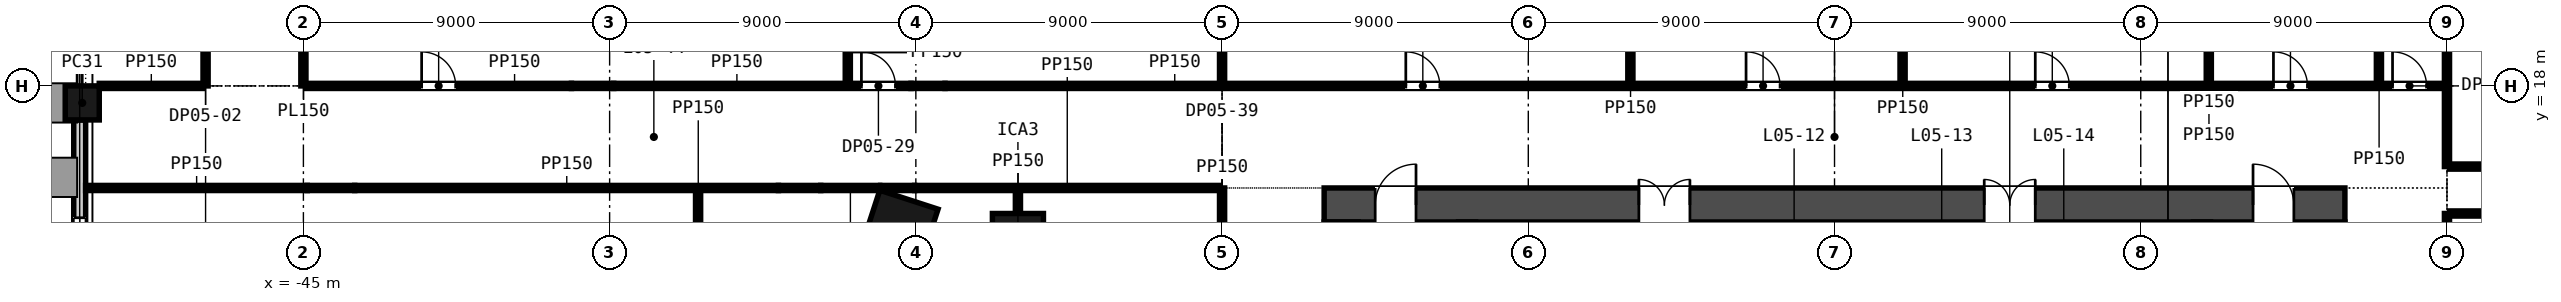
"""IFC4 building model, lengths in metres.
Left out: names, types, materials, properties, quantities, classifications, styles, units other than length and angle.
Written with IfcOpenShell. Run it as: python <this file> out.ifc"""

import sys

from ifc_helpers import new_model, si_unit, direction, frame, frame_2d, origin, origin_2d, place, context, subcontext, project, spatial, rectangle, extrude, element, fill, save


model = new_model("IFC4")
c1 = context("Model", 3, precision=1e-05, world=origin(), true_north=direction((0.0, 1.0)))
c2 = subcontext(c1, "Body", "Model", "MODEL_VIEW")
j1 = project(units=[si_unit("LENGTHUNIT", "METRE"), si_unit("PLANEANGLEUNIT", "RADIAN")], contexts=[c1])
p1 = place(None, origin())
s1 = spatial("IfcSite", under=j1, at=p1, CompositionType="ELEMENT")
p2 = place(p1, origin())
s2 = spatial("IfcBuilding", under=s1, at=p2, CompositionType="ELEMENT")
p3 = place(p2, frame((0.0, 0.0, 31.5)))
s3 = spatial("IfcBuildingStorey", under=s2, at=p3, CompositionType="ELEMENT", Elevation=31.5)
p4 = place(p3, frame((-15.0, 14.5, -0.3), z_axis=(0.0, 0.0, 1.0), x_axis=(1.0, 0.0, 0.0)))
e1 = element("IfcWall", 1, at=p4, inside=s3, PredefinedType="SOLIDWALL", context=c2, shape_type="SweptSolid", body=[
    extrude(rectangle(XDim=30.0, YDim=1.0, at=frame_2d((15.0, 0.0))), origin(), (0.0, 0.0, 1.0), 4.65),
])
p5 = place(p4, frame((9.25, 0.0, 0.3)))
e2 = element("IfcOpeningElement", 2, at=p5, cuts=e1, PredefinedType="OPENING", context=c2, shape_type="SweptSolid", body=[
    extrude(rectangle(XDim=1.5, YDim=2.1, at=frame_2d((0.75, 1.05))), frame((0.0, 0.51, 0.0), z_axis=(0.0, -1.0, 0.0), x_axis=(1.0, 0.0, 0.0)), (0.0, 0.0, 1.0), 1.02),
])
p6 = place(p4, frame((19.4, 0.0, 0.3)))
e3 = element("IfcOpeningElement", 3, at=p6, cuts=e1, PredefinedType="OPENING", context=c2, shape_type="SweptSolid", body=[
    extrude(rectangle(XDim=1.5, YDim=2.1, at=frame_2d((0.75, 1.05))), frame((0.0, 0.51, 0.0), z_axis=(0.0, -1.0, 0.0), x_axis=(1.0, 0.0, 0.0)), (0.0, 0.0, 1.0), 1.02),
])
p7 = place(p4, frame((1.5, 0.0, 0.3)))
e4 = element("IfcOpeningElement", 4, at=p7, cuts=e1, PredefinedType="OPENING", context=c2, shape_type="SweptSolid", body=[
    extrude(rectangle(XDim=1.2, YDim=2.1, at=frame_2d((0.6, 1.05))), frame((0.0, 0.51, 0.0), z_axis=(0.0, -1.0, 0.0), x_axis=(1.0, 0.0, 0.0)), (0.0, 0.0, 1.0), 1.02),
])
p8 = place(p4, frame((27.3, 0.0, 0.3)))
e5 = element("IfcOpeningElement", 5, at=p8, cuts=e1, PredefinedType="OPENING", context=c2, shape_type="SweptSolid", body=[
    extrude(rectangle(XDim=1.2, YDim=2.1, at=frame_2d((0.6, 1.05))), frame((0.0, 0.51, 0.0), z_axis=(0.0, -1.0, 0.0), x_axis=(1.0, 0.0, 0.0)), (0.0, 0.0, 1.0), 1.02),
])
p9 = place(p3, frame((-27.482, 13.799, -0.3), z_axis=(0.0, 0.0, 1.0), x_axis=(-0.309016994375, -0.951056516295, 0.0)))
e6 = element("IfcColumn", 6, at=p9, inside=s3, PredefinedType="COLUMN", context=c2, shape_type="SweptSolid", body=[
    extrude(rectangle(XDim=1.8, YDim=1.8, at=origin_2d()), origin(), (0.0, 0.0, 1.0), 4.65),
])
p10 = place(p3, frame((-24.0, 13.5, -0.3), z_axis=(0.0, 0.0, 1.0), x_axis=(1.0, 0.0, 0.0)))
e7 = element("IfcColumn", 7, at=p10, inside=s3, PredefinedType="COLUMN", context=c2, shape_type="SweptSolid", body=[
    extrude(rectangle(XDim=1.5, YDim=1.5, at=origin_2d()), origin(), (0.0, 0.0, 1.0), 4.65),
])
p11 = place(p3, frame((-51.5, 17.5, -0.3), z_axis=(0.0, 0.0, 1.0), x_axis=(0.0, -1.0, 0.0)))
e8 = element("IfcColumn", 8, at=p11, inside=s3, PredefinedType="COLUMN", context=c2, shape_type="SweptSolid", body=[
    extrude(rectangle(XDim=1.0, YDim=1.0, at=origin_2d()), origin(), (0.0, 0.0, 1.0), 4.65),
])
p12 = place(p3, frame((-51.575, 17.0, -0.3), z_axis=(0.0, 0.0, 1.0), x_axis=(0.0, -1.0, 0.0)))
e9 = element("IfcWall", 9, at=p12, inside=s3, PredefinedType="SOLIDWALL", context=c2, shape_type="SweptSolid", body=[
    extrude(rectangle(XDim=7.75, YDim=0.35, at=frame_2d((3.875, 0.0))), origin(), (0.0, 0.0, 1.0), 3.75),
])
p13 = place(p12, frame((2.875, 0.0, 1.2)))
e10 = element("IfcOpeningElement", 10, at=p13, cuts=e9, PredefinedType="OPENING", context=c2, shape_type="SweptSolid", body=[
    extrude(rectangle(XDim=2.0, YDim=2.5, at=frame_2d((1.0, 1.25))), frame((0.0, 0.185, 0.0), z_axis=(0.0, -1.0, 0.0), x_axis=(1.0, 0.0, 0.0)), (0.0, 0.0, 1.0), 0.37),
])
for number, where, z_axis, x_axis in (
    (11, (-8.275, 11.3, 0.0), (0.0, 0.0, 1.0), (0.0, 1.0, 0.0)),
    (12, (-5.875, 11.3, 0.0), (0.0, 0.0, 1.0), (0.0, 1.0, 0.0)),
    (13, (-4.125, 11.3, 0.0), (0.0, 0.0, 1.0), (0.0, 1.0, 0.0)),
    (14, (-1.325, 11.3, 0.0), (0.0, 0.0, 1.0), (0.0, 1.0, 0.0)),
    (15, (1.475, 11.3, 0.0), (0.0, 0.0, 1.0), (0.0, 1.0, 0.0)),
    (16, (4.275, 11.3, 0.0), (0.0, 0.0, 1.0), (0.0, 1.0, 0.0)),
    (17, (6.025, 11.3, 0.0), (0.0, 0.0, 1.0), (0.0, 1.0, 0.0)),
    (18, (8.825, 11.3, 0.0), (0.0, 0.0, 1.0), (0.0, 1.0, 0.0)),
):
    element("IfcWall", number, at=place(p3, frame(where, z_axis=z_axis, x_axis=x_axis)), inside=s3, PredefinedType="PARTITIONING", context=c2, shape_type="SweptSolid", body=[
        extrude(rectangle(XDim=2.7, YDim=0.25, at=frame_2d((1.35, 0.0))), origin(), (0.0, 0.0, 1.0), 4.35),
    ])
p14 = place(p3, frame((18.075, 14.25, 0.0), z_axis=(0.0, 0.0, 1.0), x_axis=(1.0, 0.0, 0.0)))
e19 = element("IfcWall", 19, at=p14, inside=s3, PredefinedType="PARTITIONING", context=c2, shape_type="SweptSolid", body=[
    extrude(rectangle(XDim=5.175, YDim=0.15, at=frame_2d((2.587, 0.0))), origin(), (0.0, 0.0, 1.0), 4.35),
])
p15 = place(p3, frame((-51.4, 15.0, 0.0), z_axis=(0.0, 0.0, 1.0), x_axis=(1.0, 0.0, 0.0)))
e20 = element("IfcWall", 20, at=p15, inside=s3, PredefinedType="PARTITIONING", context=c2, shape_type="SweptSolid", body=[
    extrude(rectangle(XDim=6.514, YDim=0.15, at=frame_2d((3.257, 0.0))), origin(), (0.0, 0.0, 1.0), 4.35),
])
p16 = place(p3, frame((-44.886, 15.0, 0.0), z_axis=(0.0, 0.0, 1.0), x_axis=(1.0, 0.0, 0.0)))
e21 = element("IfcWall", 21, at=p16, inside=s3, PredefinedType="PARTITIONING", context=c2, shape_type="SweptSolid", body=[
    extrude(rectangle(XDim=1.395, YDim=0.15, at=frame_2d((0.697, 0.0))), origin(), (0.0, 0.0, 1.0), 3.369),
])
p17 = place(p3, frame((-43.491, 15.0, 0.0), z_axis=(0.0, 0.0, 1.0), x_axis=(1.0, 0.0, 0.0)))
e22 = element("IfcWall", 22, at=p17, inside=s3, PredefinedType="PARTITIONING", context=c2, shape_type="SweptSolid", body=[
    extrude(rectangle(XDim=12.452, YDim=0.15, at=frame_2d((6.226, 0.0))), origin(), (0.0, 0.0, 1.0), 4.35),
])
p18 = place(p3, frame((-31.039, 15.0, 0.0), z_axis=(0.0, 0.0, 1.0), x_axis=(1.0, 0.0, 0.0)))
e23 = element("IfcWall", 23, at=p18, inside=s3, PredefinedType="PARTITIONING", context=c2, shape_type="SweptSolid", body=[
    extrude(rectangle(XDim=1.244, YDim=0.15, at=frame_2d((0.622, 0.0))), origin(), (0.0, 0.0, 1.0), 3.261),
])
p19 = place(p3, frame((-29.795, 15.0, 0.0), z_axis=(0.0, 0.0, 1.0), x_axis=(1.0, 0.0, 0.0)))
e24 = element("IfcWall", 24, at=p19, inside=s3, PredefinedType="PARTITIONING", context=c2, shape_type="SweptSolid", body=[
    extrude(rectangle(XDim=1.733, YDim=0.15, at=frame_2d((0.867, 0.0))), origin(), (0.0, 0.0, 1.0), 4.35),
])
p20 = place(p3, frame((-28.035, 15.0, 0.0), z_axis=(0.0, 0.0, 1.0), x_axis=(1.0, 0.0, 0.0)))
e25 = element("IfcWall", 25, at=p20, inside=s3, PredefinedType="PARTITIONING", context=c2, shape_type="SweptSolid", body=[
    extrude(rectangle(XDim=1.0, YDim=0.15, at=frame_2d((0.5, 0.0))), origin(), (0.0, 0.0, 1.0), 3.5),
])
p21 = place(p3, frame((-27.035, 15.0, 0.0), z_axis=(0.0, 0.0, 1.0), x_axis=(1.0, 0.0, 0.0)))
e26 = element("IfcWall", 26, at=p21, inside=s3, PredefinedType="PARTITIONING", context=c2, shape_type="SweptSolid", body=[
    extrude(rectangle(XDim=8.96, YDim=0.15, at=frame_2d((4.48, 0.0))), origin(), (0.0, 0.0, 1.0), 4.35),
])
p22 = place(p3, frame((18.075, 15.629, 0.0), z_axis=(0.0, 0.0, 1.0), x_axis=(1.0, 0.0, 0.0)))
e27 = element("IfcWall", 27, at=p22, inside=s3, PredefinedType="PARTITIONING", context=c2, shape_type="SweptSolid", body=[
    extrude(rectangle(XDim=7.482, YDim=0.15, at=frame_2d((3.741, 0.0))), origin(), (0.0, 0.0, 1.0), 4.35),
])
p23 = place(p3, frame((-51.0, 18.0, 0.0), z_axis=(0.0, 0.0, 1.0), x_axis=(1.0, 0.0, 0.0)))
e28 = element("IfcWall", 28, at=p23, inside=s3, PredefinedType="PARTITIONING", context=c2, shape_type="SweptSolid", body=[
    extrude(rectangle(XDim=3.05, YDim=0.15, at=frame_2d((1.525, 0.0))), origin(), (0.0, 0.0, 1.0), 4.35),
])
p24 = place(p3, frame((-44.925, 18.0, 0.0), z_axis=(0.0, 0.0, 1.0), x_axis=(1.0, 0.0, 0.0)))
e29 = element("IfcWall", 29, at=p24, inside=s3, PredefinedType="PARTITIONING", context=c2, shape_type="SweptSolid", body=[
    extrude(rectangle(XDim=7.803, YDim=0.15, at=frame_2d((3.901, 0.0))), origin(), (0.0, 0.0, 1.0), 4.35),
])
p25 = place(p24, frame((3.4, 0.0, 0.0)))
e30 = element("IfcOpeningElement", 30, at=p25, cuts=e29, PredefinedType="OPENING", context=c2, shape_type="SweptSolid", body=[
    extrude(rectangle(XDim=1.0, YDim=2.1, at=frame_2d((0.5, 1.05))), frame((0.0, 0.085, 0.0), z_axis=(0.0, -1.0, 0.0), x_axis=(1.0, 0.0, 0.0)), (0.0, 0.0, 1.0), 0.17),
])
p26 = place(p3, frame((-37.122, 18.0, 0.0), z_axis=(0.0, 0.0, 1.0), x_axis=(1.0, 0.0, 0.0)))
e31 = element("IfcWall", 31, at=p26, inside=s3, PredefinedType="PARTITIONING", context=c2, shape_type="SweptSolid", body=[
    extrude(rectangle(XDim=1.244, YDim=0.15, at=frame_2d((0.622, 0.0))), origin(), (0.0, 0.0, 1.0), 3.261),
])
p27 = place(p3, frame((-35.879, 18.0, 0.0), z_axis=(0.0, 0.0, 1.0), x_axis=(1.0, 0.0, 0.0)))
e32 = element("IfcWall", 32, at=p27, inside=s3, PredefinedType="PARTITIONING", context=c2, shape_type="SweptSolid", body=[
    extrude(rectangle(XDim=8.736, YDim=0.15, at=frame_2d((4.368, 0.0))), origin(), (0.0, 0.0, 1.0), 4.35),
])
p28 = place(p27, frame((7.279, 0.0, 0.0)))
e33 = element("IfcOpeningElement", 33, at=p28, cuts=e32, PredefinedType="OPENING", context=c2, shape_type="SweptSolid", body=[
    extrude(rectangle(XDim=1.0, YDim=2.1, at=frame_2d((0.5, 1.05))), frame((0.0, 0.085, 0.0), z_axis=(0.0, -1.0, 0.0), x_axis=(1.0, 0.0, 0.0)), (0.0, 0.0, 1.0), 0.17),
])
p29 = place(p3, frame((-27.142, 18.0, 0.0), z_axis=(0.0, 0.0, 1.0), x_axis=(1.0, 0.0, 0.0)))
e34 = element("IfcWall", 34, at=p29, inside=s3, PredefinedType="PARTITIONING", context=c2, shape_type="SweptSolid", body=[
    extrude(rectangle(XDim=1.0, YDim=0.15, at=frame_2d((0.5, 0.0))), origin(), (0.0, 0.0, 1.0), 3.5),
])
p30 = place(p3, frame((-26.142, 18.0, 0.0), z_axis=(0.0, 0.0, 1.0), x_axis=(1.0, 0.0, 0.0)))
e35 = element("IfcWall", 35, at=p30, inside=s3, PredefinedType="PARTITIONING", context=c2, shape_type="SweptSolid", body=[
    extrude(rectangle(XDim=44.067, YDim=0.15, at=frame_2d((22.034, 0.0))), origin(), (0.0, 0.0, 1.0), 4.35),
])
p31 = place(p30, frame((13.542, 0.0, 0.0)))
e36 = element("IfcOpeningElement", 36, at=p31, cuts=e35, PredefinedType="OPENING", context=c2, shape_type="SweptSolid", body=[
    extrude(rectangle(XDim=1.0, YDim=2.1, at=frame_2d((0.5, 1.05))), frame((0.0, 0.085, 0.0), z_axis=(0.0, -1.0, 0.0), x_axis=(1.0, 0.0, 0.0)), (0.0, 0.0, 1.0), 0.17),
])
p32 = place(p30, frame((23.542, 0.0, 0.0)))
e37 = element("IfcOpeningElement", 37, at=p32, cuts=e35, PredefinedType="OPENING", context=c2, shape_type="SweptSolid", body=[
    extrude(rectangle(XDim=1.0, YDim=2.1, at=frame_2d((0.5, 1.05))), frame((0.0, 0.085, 0.0), z_axis=(0.0, -1.0, 0.0), x_axis=(1.0, 0.0, 0.0)), (0.0, 0.0, 1.0), 0.17),
])
p33 = place(p30, frame((32.042, 0.0, 0.0)))
e38 = element("IfcOpeningElement", 38, at=p33, cuts=e35, PredefinedType="OPENING", context=c2, shape_type="SweptSolid", body=[
    extrude(rectangle(XDim=1.0, YDim=2.1, at=frame_2d((0.5, 1.05))), frame((0.0, 0.085, 0.0), z_axis=(0.0, -1.0, 0.0), x_axis=(1.0, 0.0, 0.0)), (0.0, 0.0, 1.0), 0.17),
])
p34 = place(p30, frame((39.042, 0.0, 0.0)))
e39 = element("IfcOpeningElement", 39, at=p34, cuts=e35, PredefinedType="OPENING", context=c2, shape_type="SweptSolid", body=[
    extrude(rectangle(XDim=1.0, YDim=2.1, at=frame_2d((0.5, 1.05))), frame((0.0, 0.085, 0.0), z_axis=(0.0, -1.0, 0.0), x_axis=(1.0, 0.0, 0.0)), (0.0, 0.0, 1.0), 0.17),
])
p35 = place(p30, frame((42.542, 0.0, 0.0)))
e40 = element("IfcOpeningElement", 40, at=p35, cuts=e35, PredefinedType="OPENING", context=c2, shape_type="SweptSolid", body=[
    extrude(rectangle(XDim=1.0, YDim=2.1, at=frame_2d((0.5, 1.05))), frame((0.0, 0.085, 0.0), z_axis=(0.0, -1.0, 0.0), x_axis=(1.0, 0.0, 0.0)), (0.0, 0.0, 1.0), 0.17),
])
p36 = place(p3, frame((-47.875, 18.0, 0.0), z_axis=(0.0, 0.0, 1.0), x_axis=(0.0, 1.0, 0.0)))
e41 = element("IfcWall", 41, at=p36, inside=s3, PredefinedType="PARTITIONING", context=c2, shape_type="SweptSolid", body=[
    extrude(rectangle(XDim=5.109, YDim=0.15, at=frame_2d((2.555, 0.0))), origin(), (0.0, 0.0, 1.0), 4.35),
])
p37 = place(p36, frame((3.65, 0.0, 0.0)))
e42 = element("IfcOpeningElement", 42, at=p37, cuts=e41, PredefinedType="OPENING", context=c2, shape_type="SweptSolid", body=[
    extrude(rectangle(XDim=0.9, YDim=2.1, at=frame_2d((0.45, 1.05))), frame((0.0, 0.085, 0.0), z_axis=(0.0, -1.0, 0.0), x_axis=(1.0, 0.0, 0.0)), (0.0, 0.0, 1.0), 0.17),
])
p38 = place(p3, frame((-45.0, 18.0, 0.0), z_axis=(0.0, 0.0, 1.0), x_axis=(0.0, 1.0, 0.0)))
e43 = element("IfcWall", 43, at=p38, inside=s3, PredefinedType="PARTITIONING", context=c2, shape_type="SweptSolid", body=[
    extrude(rectangle(XDim=3.691, YDim=0.15, at=frame_2d((1.846, 0.0))), origin(), (0.0, 0.0, 1.0), 4.35),
])
p39 = place(p3, frame((-33.4, 1.326, 0.0), z_axis=(0.0, 0.0, 1.0), x_axis=(0.0, 1.0, 0.0)))
e44 = element("IfcWall", 44, at=p39, inside=s3, PredefinedType="PARTITIONING", context=c2, shape_type="SweptSolid", body=[
    extrude(rectangle(XDim=13.599, YDim=0.15, at=frame_2d((6.8, 0.0))), origin(), (0.0, 0.0, 1.0), 4.35),
])
p40 = place(p3, frame((-29.0, 18.075, 0.0), z_axis=(0.0, 0.0, 1.0), x_axis=(0.0, 1.0, 0.0)))
e45 = element("IfcWall", 45, at=p40, inside=s3, PredefinedType="PARTITIONING", context=c2, shape_type="SweptSolid", body=[
    extrude(rectangle(XDim=1.802, YDim=0.15, at=frame_2d((0.901, 0.0))), origin(), (0.0, 0.0, 1.0), 3.261),
])
p41 = place(p3, frame((-24.0, 14.25, 0.0), z_axis=(0.0, 0.0, 1.0), x_axis=(0.0, 1.0, 0.0)))
e46 = element("IfcWall", 46, at=p41, inside=s3, PredefinedType="PARTITIONING", context=c2, shape_type="SweptSolid", body=[
    extrude(rectangle(XDim=0.675, YDim=0.15, at=frame_2d((0.337, 0.0))), origin(), (0.0, 0.0, 1.0), 3.747),
])
p42 = place(p3, frame((-18.0, 1.251, 0.0), z_axis=(0.0, 0.0, 1.0), x_axis=(0.0, 1.0, 0.0)))
e47 = element("IfcWall", 47, at=p42, inside=s3, PredefinedType="PARTITIONING", context=c2, shape_type="SweptSolid", body=[
    extrude(rectangle(XDim=13.749, YDim=0.15, at=frame_2d((6.875, 0.0))), origin(), (0.0, 0.0, 1.0), 4.35),
])
p43 = place(p42, frame((5.9, 0.0, 0.0)))
e48 = element("IfcOpeningElement", 48, at=p43, cuts=e47, PredefinedType="OPENING", context=c2, shape_type="SweptSolid", body=[
    extrude(rectangle(XDim=1.8, YDim=2.4, at=frame_2d((0.9, 1.2))), frame((0.0, 0.085, 0.0), z_axis=(0.0, -1.0, 0.0), x_axis=(1.0, 0.0, 0.0)), (0.0, 0.0, 1.0), 0.17),
])
p44 = place(p3, frame((-18.0, 18.075, 0.0), z_axis=(0.0, 0.0, 1.0), x_axis=(0.0, 1.0, 0.0)))
e49 = element("IfcWall", 49, at=p44, inside=s3, PredefinedType="PARTITIONING", context=c2, shape_type="SweptSolid", body=[
    extrude(rectangle(XDim=13.025, YDim=0.15, at=frame_2d((6.513, 0.0))), origin(), (0.0, 0.0, 1.0), 4.35),
])
for number, where, z_axis, x_axis in (
    (50, (-6.0, 18.075, 0.0), (0.0, 0.0, 1.0), (0.0, 1.0, 0.0)),
    (51, (2.0, 18.075, 0.0), (0.0, 0.0, 1.0), (0.0, 1.0, 0.0)),
):
    element("IfcWall", number, at=place(p3, frame(where, z_axis=z_axis, x_axis=x_axis)), inside=s3, PredefinedType="PARTITIONING", context=c2, shape_type="SweptSolid", body=[
        extrude(rectangle(XDim=12.125, YDim=0.15, at=frame_2d((6.062, 0.0))), origin(), (0.0, 0.0, 1.0), 4.35),
    ])
p45 = place(p3, frame((11.0, 18.075, 0.0), z_axis=(0.0, 0.0, 1.0), x_axis=(0.0, 1.0, 0.0)))
e52 = element("IfcWall", 52, at=p45, inside=s3, PredefinedType="PARTITIONING", context=c2, shape_type="SweptSolid", body=[
    extrude(rectangle(XDim=8.868, YDim=0.15, at=frame_2d((4.434, 0.0))), origin(), (0.0, 0.0, 1.0), 3.671),
])
p46 = place(p3, frame((16.0, 18.075, 0.0), z_axis=(0.0, 0.0, 1.0), x_axis=(0.0, 1.0, 0.0)))
e53 = element("IfcWall", 53, at=p46, inside=s3, PredefinedType="PARTITIONING", context=c2, shape_type="SweptSolid", body=[
    extrude(rectangle(XDim=9.626, YDim=0.15, at=frame_2d((4.813, 0.0))), origin(), (0.0, 0.0, 1.0), 4.35),
])
p47 = place(p3, frame((18.0, 0.0, 0.0), z_axis=(0.0, 0.0, 1.0), x_axis=(0.0, 1.0, 0.0)))
e54 = element("IfcWall", 54, at=p47, inside=s3, PredefinedType="PARTITIONING", context=c2, shape_type="SweptSolid", body=[
    extrude(rectangle(XDim=14.25, YDim=0.15, at=frame_2d((7.125, 0.0))), origin(), (0.0, 0.0, 1.0), 4.35),
])
p48 = place(p47, frame((6.65, 0.0, 0.0)))
e55 = element("IfcOpeningElement", 55, at=p48, cuts=e54, PredefinedType="OPENING", context=c2, shape_type="SweptSolid", body=[
    extrude(rectangle(XDim=1.0, YDim=2.1, at=frame_2d((0.5, 1.05))), frame((0.0, 0.085, 0.0), z_axis=(0.0, -1.0, 0.0), x_axis=(1.0, 0.0, 0.0)), (0.0, 0.0, 1.0), 0.17),
])
p49 = place(p3, frame((18.0, 15.629, 0.0), z_axis=(0.0, 0.0, 1.0), x_axis=(0.0, 1.0, 0.0)))
e56 = element("IfcWall", 56, at=p49, inside=s3, PredefinedType="PARTITIONING", context=c2, shape_type="SweptSolid", body=[
    extrude(rectangle(XDim=9.85, YDim=0.15, at=frame_2d((4.925, 0.0))), origin(), (0.0, 0.0, 1.0), 4.35),
])
p50 = place(p13, origin())
e57 = element("IfcWindow", 57, at=p50, inside=s3, PartitioningType="SINGLE_PANEL", PredefinedType="WINDOW", context=c2, shape_type="SweptSolid", body=[
    extrude(rectangle(XDim=2.0, YDim=2.5, at=frame_2d((1.0, 1.25))), frame((0.0, 0.03, 0.0), z_axis=(0.0, -1.0, 0.0), x_axis=(1.0, 0.0, 0.0)), (0.0, 0.0, 1.0), 0.06),
])
fill(e10, e57)
p51 = place(p5, origin())
e58 = element("IfcDoor", 58, at=p51, inside=s3, OperationType="DOUBLE_DOOR_SINGLE_SWING", PredefinedType="DOOR", context=c2, shape_type="SweptSolid", body=[
    extrude(rectangle(XDim=1.5, YDim=2.1, at=frame_2d((0.75, 1.05))), frame((0.0, 0.025, 0.0), z_axis=(0.0, -1.0, 0.0), x_axis=(1.0, 0.0, 0.0)), (0.0, 0.0, 1.0), 0.05),
])
fill(e2, e58)
p52 = place(p6, origin())
e59 = element("IfcDoor", 59, at=p52, inside=s3, OperationType="DOUBLE_DOOR_SINGLE_SWING", PredefinedType="DOOR", context=c2, shape_type="SweptSolid", body=[
    extrude(rectangle(XDim=1.5, YDim=2.1, at=frame_2d((0.75, 1.05))), frame((0.0, 0.025, 0.0), z_axis=(0.0, -1.0, 0.0), x_axis=(1.0, 0.0, 0.0)), (0.0, 0.0, 1.0), 0.05),
])
fill(e3, e59)
p53 = place(p7, origin())
e60 = element("IfcDoor", 60, at=p53, inside=s3, OperationType="SINGLE_SWING_RIGHT", PredefinedType="DOOR", context=c2, shape_type="SweptSolid", body=[
    extrude(rectangle(XDim=1.2, YDim=2.1, at=frame_2d((0.6, 1.05))), frame((0.0, 0.025, 0.0), z_axis=(0.0, -1.0, 0.0), x_axis=(1.0, 0.0, 0.0)), (0.0, 0.0, 1.0), 0.05),
])
fill(e4, e60)
p54 = place(p8, origin())
e61 = element("IfcDoor", 61, at=p54, inside=s3, OperationType="SINGLE_SWING_LEFT", PredefinedType="DOOR", context=c2, shape_type="SweptSolid", body=[
    extrude(rectangle(XDim=1.2, YDim=2.1, at=frame_2d((0.6, 1.05))), frame((0.0, 0.025, 0.0), z_axis=(0.0, -1.0, 0.0), x_axis=(1.0, 0.0, 0.0)), (0.0, 0.0, 1.0), 0.05),
])
fill(e5, e61)
p55 = place(p25, origin())
e62 = element("IfcDoor", 62, at=p55, inside=s3, OperationType="SINGLE_SWING_LEFT", PredefinedType="DOOR", context=c2, shape_type="SweptSolid", body=[
    extrude(rectangle(XDim=1.0, YDim=2.1, at=frame_2d((0.5, 1.05))), frame((0.0, 0.025, 0.0), z_axis=(0.0, -1.0, 0.0), x_axis=(1.0, 0.0, 0.0)), (0.0, 0.0, 1.0), 0.05),
])
fill(e30, e62)
p56 = place(p28, origin())
e63 = element("IfcDoor", 63, at=p56, inside=s3, OperationType="SINGLE_SWING_LEFT", PredefinedType="DOOR", context=c2, shape_type="SweptSolid", body=[
    extrude(rectangle(XDim=1.0, YDim=2.1, at=frame_2d((0.5, 1.05))), frame((0.0, 0.025, 0.0), z_axis=(0.0, -1.0, 0.0), x_axis=(1.0, 0.0, 0.0)), (0.0, 0.0, 1.0), 0.05),
])
fill(e33, e63)
p57 = place(p31, origin())
e64 = element("IfcDoor", 64, at=p57, inside=s3, OperationType="SINGLE_SWING_LEFT", PredefinedType="DOOR", context=c2, shape_type="SweptSolid", body=[
    extrude(rectangle(XDim=1.0, YDim=2.1, at=frame_2d((0.5, 1.05))), frame((0.0, 0.025, 0.0), z_axis=(0.0, -1.0, 0.0), x_axis=(1.0, 0.0, 0.0)), (0.0, 0.0, 1.0), 0.05),
])
fill(e36, e64)
p58 = place(p32, origin())
e65 = element("IfcDoor", 65, at=p58, inside=s3, OperationType="SINGLE_SWING_LEFT", PredefinedType="DOOR", context=c2, shape_type="SweptSolid", body=[
    extrude(rectangle(XDim=1.0, YDim=2.1, at=frame_2d((0.5, 1.05))), frame((0.0, 0.025, 0.0), z_axis=(0.0, -1.0, 0.0), x_axis=(1.0, 0.0, 0.0)), (0.0, 0.0, 1.0), 0.05),
])
fill(e37, e65)
p59 = place(p33, origin())
e66 = element("IfcDoor", 66, at=p59, inside=s3, OperationType="SINGLE_SWING_LEFT", PredefinedType="DOOR", context=c2, shape_type="SweptSolid", body=[
    extrude(rectangle(XDim=1.0, YDim=2.1, at=frame_2d((0.5, 1.05))), frame((0.0, 0.025, 0.0), z_axis=(0.0, -1.0, 0.0), x_axis=(1.0, 0.0, 0.0)), (0.0, 0.0, 1.0), 0.05),
])
fill(e38, e66)
p60 = place(p34, origin())
e67 = element("IfcDoor", 67, at=p60, inside=s3, OperationType="SINGLE_SWING_LEFT", PredefinedType="DOOR", context=c2, shape_type="SweptSolid", body=[
    extrude(rectangle(XDim=1.0, YDim=2.1, at=frame_2d((0.5, 1.05))), frame((0.0, 0.025, 0.0), z_axis=(0.0, -1.0, 0.0), x_axis=(1.0, 0.0, 0.0)), (0.0, 0.0, 1.0), 0.05),
])
fill(e39, e67)
p61 = place(p35, origin())
e68 = element("IfcDoor", 68, at=p61, inside=s3, OperationType="SINGLE_SWING_LEFT", PredefinedType="DOOR", context=c2, shape_type="SweptSolid", body=[
    extrude(rectangle(XDim=1.0, YDim=2.1, at=frame_2d((0.5, 1.05))), frame((0.0, 0.025, 0.0), z_axis=(0.0, -1.0, 0.0), x_axis=(1.0, 0.0, 0.0)), (0.0, 0.0, 1.0), 0.05),
])
fill(e40, e68)
save(model, sys.argv[1])
